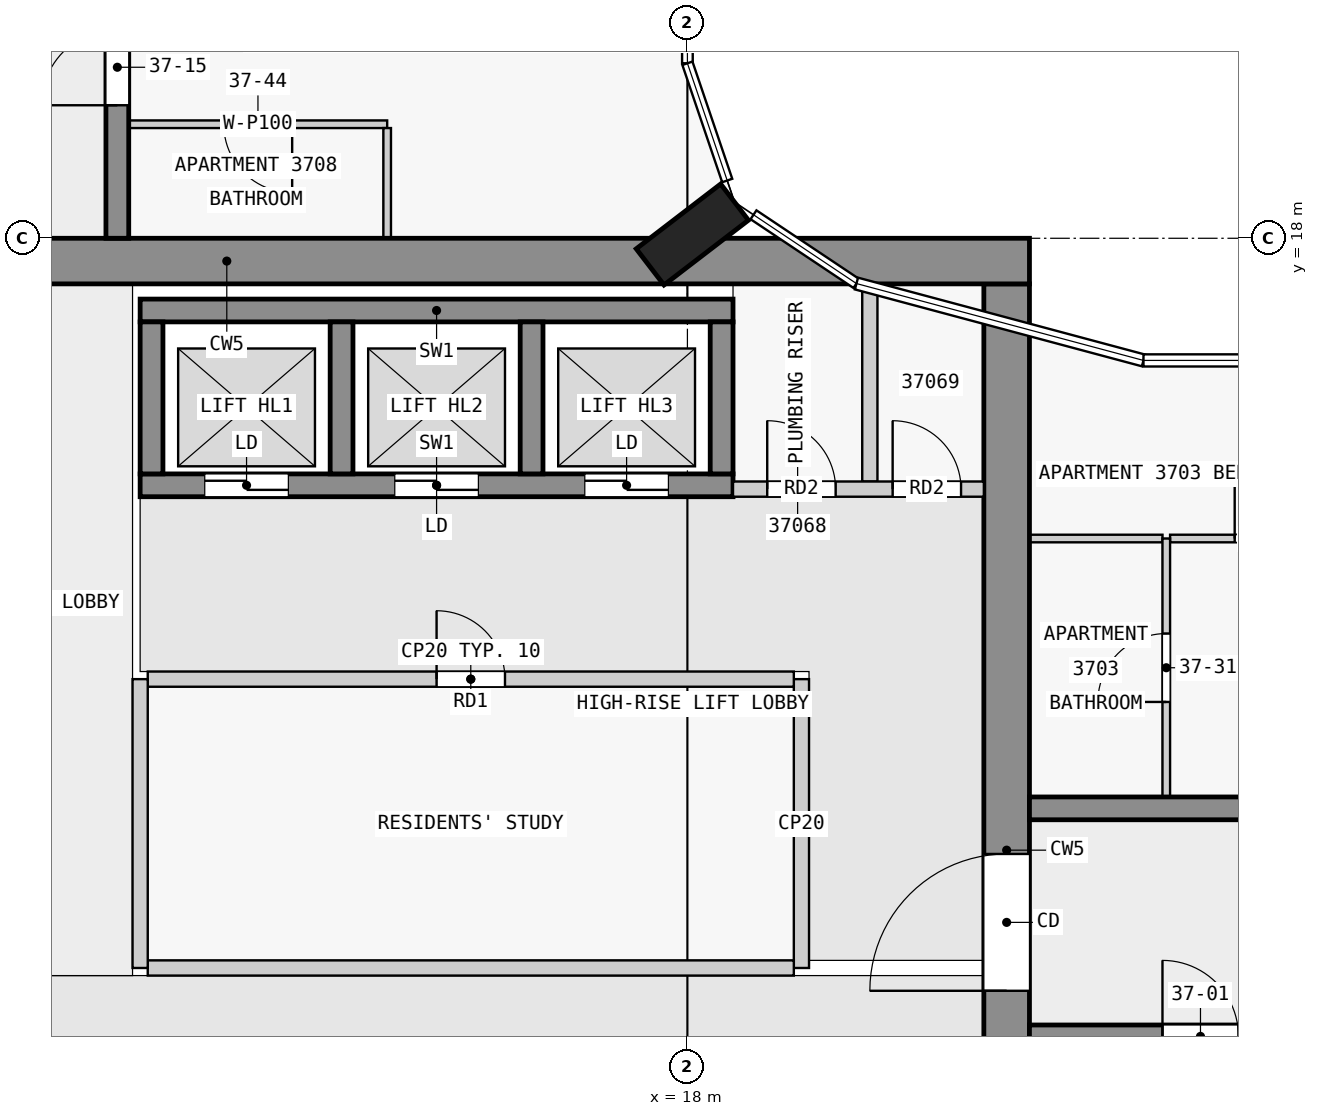
"""IFC4 building model, lengths in metres.
Left out: names, types, materials, properties, quantities, classifications, styles, units other than length and angle.
Written with IfcOpenShell. Run it as: python <this file> out.ifc"""

import sys

from ifc_helpers import new_model, si_unit, direction, frame, frame_2d, origin, origin_2d, place, context, subcontext, project, spatial, rectangle, extrude, element, fill, save


model = new_model("IFC4")
c1 = context("Model", 3, precision=1e-05, world=origin(), true_north=direction((0.0, 1.0)))
c2 = subcontext(c1, "Body", "Model", "MODEL_VIEW")
j1 = project(units=[si_unit("LENGTHUNIT", "METRE"), si_unit("PLANEANGLEUNIT", "RADIAN")], contexts=[c1])
p1 = place(None, origin())
s1 = spatial("IfcSite", under=j1, at=p1, CompositionType="ELEMENT")
p2 = place(p1, origin())
s2 = spatial("IfcBuilding", under=s1, at=p2, CompositionType="ELEMENT")
p3 = place(p2, frame((0.0, 0.0, 146.4)))
s3 = spatial("IfcBuildingStorey", under=s2, at=p3, CompositionType="ELEMENT", Elevation=146.4)
p4 = place(p3, frame((18.065, 18.05, 0.0), z_axis=(0.0, 0.0, 1.0), x_axis=(-0.608810846443, 0.793315418515, 0.0)))
e1 = element("IfcColumn", 1, at=p4, inside=s3, PredefinedType="COLUMN", context=c2, shape_type="SweptSolid", body=[
    extrude(rectangle(XDim=0.6, YDim=1.4, at=origin_2d()), origin(), (0.0, 0.0, 1.0), 3.5),
])
p5 = place(p3, frame((1.38, 17.7, 0.0), z_axis=(0.0, 0.0, 1.0), x_axis=(1.0, 0.0, 0.0)))
e2 = element("IfcWall", 2, at=p5, inside=s3, PredefinedType="SHEAR", context=c2, shape_type="SweptSolid", body=[
    extrude(rectangle(XDim=21.12, YDim=0.6, at=frame_2d((10.56, 0.0))), origin(), (0.0, 0.0, 1.0), 3.25),
])
p6 = place(p5, frame((6.4, 0.0, 0.0)))
e3 = element("IfcOpeningElement", 3, at=p6, cuts=e2, PredefinedType="OPENING", context=c2, shape_type="SweptSolid", body=[
    extrude(rectangle(XDim=1.8, YDim=2.1, at=frame_2d((0.9, 1.05))), frame((0.0, 0.31, 0.0), z_axis=(0.0, -1.0, 0.0), x_axis=(1.0, 0.0, 0.0)), (0.0, 0.0, 1.0), 0.62),
])
p7 = place(p3, frame((22.2, 2.5, 0.0), z_axis=(0.0, 0.0, 1.0), x_axis=(0.0, 1.0, 0.0)))
e4 = element("IfcWall", 4, at=p7, inside=s3, PredefinedType="SHEAR", context=c2, shape_type="SweptSolid", body=[
    extrude(rectangle(XDim=14.9, YDim=0.6, at=frame_2d((7.45, 0.0))), origin(), (0.0, 0.0, 1.0), 3.25),
])
p8 = place(p7, frame((5.6, 0.0, 0.0)))
e5 = element("IfcOpeningElement", 5, at=p8, cuts=e4, PredefinedType="OPENING", context=c2, shape_type="SweptSolid", body=[
    extrude(rectangle(XDim=1.8, YDim=2.1, at=frame_2d((0.9, 1.05))), frame((0.0, 0.31, 0.0), z_axis=(0.0, -1.0, 0.0), x_axis=(1.0, 0.0, 0.0)), (0.0, 0.0, 1.0), 0.62),
])
p9 = place(p3, frame((10.8, 17.05, 0.0), z_axis=(0.0, 0.0, 1.0), x_axis=(1.0, 0.0, 0.0)))
e6 = element("IfcWall", 6, at=p9, inside=s3, PredefinedType="SHEAR", context=c2, shape_type="SweptSolid", body=[
    extrude(rectangle(XDim=7.8, YDim=0.3, at=frame_2d((3.9, 0.0))), origin(), (0.0, 0.0, 1.0), 3.25),
])
p10 = place(p3, frame((10.8, 14.75, 0.0), z_axis=(0.0, 0.0, 1.0), x_axis=(1.0, 0.0, 0.0)))
e7 = element("IfcWall", 7, at=p10, inside=s3, PredefinedType="SHEAR", context=c2, shape_type="SweptSolid", body=[
    extrude(rectangle(XDim=7.8, YDim=0.3, at=frame_2d((3.9, 0.0))), origin(), (0.0, 0.0, 1.0), 3.25),
])
p11 = place(p10, frame((0.85, 0.0, 0.0)))
e8 = element("IfcOpeningElement", 8, at=p11, cuts=e7, PredefinedType="OPENING", context=c2, shape_type="SweptSolid", body=[
    extrude(rectangle(XDim=1.1, YDim=2.1, at=frame_2d((0.55, 1.05))), frame((0.0, 0.16, 0.0), z_axis=(0.0, -1.0, 0.0), x_axis=(1.0, 0.0, 0.0)), (0.0, 0.0, 1.0), 0.32),
])
p12 = place(p10, frame((3.35, 0.0, 0.0)))
e9 = element("IfcOpeningElement", 9, at=p12, cuts=e7, PredefinedType="OPENING", context=c2, shape_type="SweptSolid", body=[
    extrude(rectangle(XDim=1.1, YDim=2.1, at=frame_2d((0.55, 1.05))), frame((0.0, 0.16, 0.0), z_axis=(0.0, -1.0, 0.0), x_axis=(1.0, 0.0, 0.0)), (0.0, 0.0, 1.0), 0.32),
])
p13 = place(p10, frame((5.85, 0.0, 0.0)))
e10 = element("IfcOpeningElement", 10, at=p13, cuts=e7, PredefinedType="OPENING", context=c2, shape_type="SweptSolid", body=[
    extrude(rectangle(XDim=1.1, YDim=2.1, at=frame_2d((0.55, 1.05))), frame((0.0, 0.16, 0.0), z_axis=(0.0, -1.0, 0.0), x_axis=(1.0, 0.0, 0.0)), (0.0, 0.0, 1.0), 0.32),
])
for number, where, z_axis, x_axis in (
    (11, (10.95, 14.9, 0.0), (0.0, 0.0, 1.0), (0.0, 1.0, 0.0)),
    (12, (13.45, 14.9, 0.0), (0.0, 0.0, 1.0), (0.0, 1.0, 0.0)),
    (13, (15.95, 14.9, 0.0), (0.0, 0.0, 1.0), (0.0, 1.0, 0.0)),
    (14, (18.45, 14.9, 0.0), (0.0, 0.0, 1.0), (0.0, 1.0, 0.0)),
):
    element("IfcWall", number, at=place(p3, frame(where, z_axis=z_axis, x_axis=x_axis)), inside=s3, PredefinedType="SHEAR", context=c2, shape_type="SweptSolid", body=[
        extrude(rectangle(XDim=2.0, YDim=0.3, at=frame_2d((1.0, 0.0))), origin(), (0.0, 0.0, 1.0), 3.25),
    ])
p14 = place(p3, frame((22.5, 7.5, 0.0), z_axis=(0.0, 0.0, 1.0), x_axis=(1.0, 0.0, 0.0)))
e15 = element("IfcWall", 15, at=p14, inside=s3, PredefinedType="SHEAR", context=c2, shape_type="SweptSolid", body=[
    extrude(rectangle(XDim=22.5, YDim=0.3, at=frame_2d((11.25, 0.0))), origin(), (0.0, 0.0, 1.0), 3.25),
])
p15 = place(p14, frame((1.75, 0.0, 0.0)))
e16 = element("IfcOpeningElement", 16, at=p15, cuts=e15, PredefinedType="OPENING", context=c2, shape_type="SweptSolid", body=[
    extrude(rectangle(XDim=1.0, YDim=2.1, at=frame_2d((0.5, 1.05))), frame((0.0, 0.16, 0.0), z_axis=(0.0, -1.0, 0.0), x_axis=(1.0, 0.0, 0.0)), (0.0, 0.0, 1.0), 0.32),
])
p16 = place(p14, frame((6.25, 0.0, 0.0)))
e17 = element("IfcOpeningElement", 17, at=p16, cuts=e15, PredefinedType="OPENING", context=c2, shape_type="SweptSolid", body=[
    extrude(rectangle(XDim=1.0, YDim=2.1, at=frame_2d((0.5, 1.05))), frame((0.0, 0.16, 0.0), z_axis=(0.0, -1.0, 0.0), x_axis=(1.0, 0.0, 0.0)), (0.0, 0.0, 1.0), 0.32),
])
p17 = place(p14, frame((10.35, 0.0, 0.0)))
e18 = element("IfcOpeningElement", 18, at=p17, cuts=e15, PredefinedType="OPENING", context=c2, shape_type="SweptSolid", body=[
    extrude(rectangle(XDim=1.8, YDim=2.1, at=frame_2d((0.9, 1.05))), frame((0.0, 0.16, 0.0), z_axis=(0.0, -1.0, 0.0), x_axis=(1.0, 0.0, 0.0)), (0.0, 0.0, 1.0), 0.32),
])
p18 = place(p14, frame((16.85, 0.0, 0.0)))
e19 = element("IfcOpeningElement", 19, at=p18, cuts=e15, PredefinedType="OPENING", context=c2, shape_type="SweptSolid", body=[
    extrude(rectangle(XDim=1.0, YDim=2.1, at=frame_2d((0.5, 1.05))), frame((0.0, 0.16, 0.0), z_axis=(0.0, -1.0, 0.0), x_axis=(1.0, 0.0, 0.0)), (0.0, 0.0, 1.0), 0.32),
])
p19 = place(p3, frame((22.5, 10.5, 0.0), z_axis=(0.0, 0.0, 1.0), x_axis=(1.0, 0.0, 0.0)))
e20 = element("IfcWall", 20, at=p19, inside=s3, PredefinedType="SHEAR", context=c2, shape_type="SweptSolid", body=[
    extrude(rectangle(XDim=22.5, YDim=0.3, at=frame_2d((11.25, 0.0))), origin(), (0.0, 0.0, 1.0), 3.25),
])
p20 = place(p19, frame((4.05, 0.0, 0.0)))
e21 = element("IfcOpeningElement", 21, at=p20, cuts=e20, PredefinedType="OPENING", context=c2, shape_type="SweptSolid", body=[
    extrude(rectangle(XDim=1.0, YDim=2.1, at=frame_2d((0.5, 1.05))), frame((0.0, 0.16, 0.0), z_axis=(0.0, -1.0, 0.0), x_axis=(1.0, 0.0, 0.0)), (0.0, 0.0, 1.0), 0.32),
])
p21 = place(p19, frame((10.85, 0.0, 0.0)))
e22 = element("IfcOpeningElement", 22, at=p21, cuts=e20, PredefinedType="OPENING", context=c2, shape_type="SweptSolid", body=[
    extrude(rectangle(XDim=0.9, YDim=2.1, at=frame_2d((0.45, 1.05))), frame((0.0, 0.16, 0.0), z_axis=(0.0, -1.0, 0.0), x_axis=(1.0, 0.0, 0.0)), (0.0, 0.0, 1.0), 0.32),
])
p22 = place(p19, frame((15.25, 0.0, 0.0)))
e23 = element("IfcOpeningElement", 23, at=p22, cuts=e20, PredefinedType="OPENING", context=c2, shape_type="SweptSolid", body=[
    extrude(rectangle(XDim=1.0, YDim=2.1, at=frame_2d((0.5, 1.05))), frame((0.0, 0.16, 0.0), z_axis=(0.0, -1.0, 0.0), x_axis=(1.0, 0.0, 0.0)), (0.0, 0.0, 1.0), 0.32),
])
p23 = place(p19, frame((18.75, 0.0, 0.0)))
e24 = element("IfcOpeningElement", 24, at=p23, cuts=e20, PredefinedType="OPENING", context=c2, shape_type="SweptSolid", body=[
    extrude(rectangle(XDim=0.9, YDim=2.1, at=frame_2d((0.45, 1.05))), frame((0.0, 0.16, 0.0), z_axis=(0.0, -1.0, 0.0), x_axis=(1.0, 0.0, 0.0)), (0.0, 0.0, 1.0), 0.32),
])
p24 = place(p19, frame((20.95, 0.0, 0.0)))
e25 = element("IfcOpeningElement", 25, at=p24, cuts=e20, PredefinedType="OPENING", context=c2, shape_type="SweptSolid", body=[
    extrude(rectangle(XDim=1.0, YDim=2.1, at=frame_2d((0.5, 1.05))), frame((0.0, 0.16, 0.0), z_axis=(0.0, -1.0, 0.0), x_axis=(1.0, 0.0, 0.0)), (0.0, 0.0, 1.0), 0.32),
])
p25 = place(p3, frame((10.5, 18.0, 0.0), z_axis=(0.0, 0.0, 1.0), x_axis=(0.0, 1.0, 0.0)))
e26 = element("IfcWall", 26, at=p25, inside=s3, PredefinedType="SHEAR", context=c2, shape_type="SweptSolid", body=[
    extrude(rectangle(XDim=27.0, YDim=0.3, at=frame_2d((13.5, 0.0))), origin(), (0.0, 0.0, 1.0), 3.25),
])
p26 = place(p25, frame((1.75, 0.0, 0.0)))
e27 = element("IfcOpeningElement", 27, at=p26, cuts=e26, PredefinedType="OPENING", context=c2, shape_type="SweptSolid", body=[
    extrude(rectangle(XDim=1.0, YDim=2.1, at=frame_2d((0.5, 1.05))), frame((0.0, 0.16, 0.0), z_axis=(0.0, -1.0, 0.0), x_axis=(1.0, 0.0, 0.0)), (0.0, 0.0, 1.0), 0.32),
])
p27 = place(p25, frame((6.25, 0.0, 0.0)))
e28 = element("IfcOpeningElement", 28, at=p27, cuts=e26, PredefinedType="OPENING", context=c2, shape_type="SweptSolid", body=[
    extrude(rectangle(XDim=1.0, YDim=2.1, at=frame_2d((0.5, 1.05))), frame((0.0, 0.16, 0.0), z_axis=(0.0, -1.0, 0.0), x_axis=(1.0, 0.0, 0.0)), (0.0, 0.0, 1.0), 0.32),
])
p28 = place(p25, frame((10.35, 0.0, 0.0)))
e29 = element("IfcOpeningElement", 29, at=p28, cuts=e26, PredefinedType="OPENING", context=c2, shape_type="SweptSolid", body=[
    extrude(rectangle(XDim=1.8, YDim=2.1, at=frame_2d((0.9, 1.05))), frame((0.0, 0.16, 0.0), z_axis=(0.0, -1.0, 0.0), x_axis=(1.0, 0.0, 0.0)), (0.0, 0.0, 1.0), 0.32),
])
p29 = place(p25, frame((15.25, 0.0, 0.0)))
e30 = element("IfcOpeningElement", 30, at=p29, cuts=e26, PredefinedType="OPENING", context=c2, shape_type="SweptSolid", body=[
    extrude(rectangle(XDim=1.0, YDim=2.1, at=frame_2d((0.5, 1.05))), frame((0.0, 0.16, 0.0), z_axis=(0.0, -1.0, 0.0), x_axis=(1.0, 0.0, 0.0)), (0.0, 0.0, 1.0), 0.32),
])
p30 = place(p25, frame((21.35, 0.0, 0.0)))
e31 = element("IfcOpeningElement", 31, at=p30, cuts=e26, PredefinedType="OPENING", context=c2, shape_type="SweptSolid", body=[
    extrude(rectangle(XDim=1.0, YDim=2.1, at=frame_2d((0.5, 1.05))), frame((0.0, 0.16, 0.0), z_axis=(0.0, -1.0, 0.0), x_axis=(1.0, 0.0, 0.0)), (0.0, 0.0, 1.0), 0.32),
])
p31 = place(p3, frame((10.8, 8.4, 0.0), z_axis=(0.0, 0.0, 1.0), x_axis=(0.0, 1.0, 0.0)))
e32 = element("IfcWall", 32, at=p31, inside=s3, PredefinedType="PARTITIONING", context=c2, shape_type="SweptSolid", body=[
    extrude(rectangle(XDim=3.8, YDim=0.2, at=frame_2d((1.9, 0.0))), origin(), (0.0, 0.0, 1.0), 3.25),
])
p32 = place(p3, frame((10.9, 8.4, 0.0), z_axis=(0.0, 0.0, 1.0), x_axis=(1.0, 0.0, 0.0)))
e33 = element("IfcWall", 33, at=p32, inside=s3, PredefinedType="PARTITIONING", context=c2, shape_type="SweptSolid", body=[
    extrude(rectangle(XDim=8.5, YDim=0.2, at=frame_2d((4.25, 0.0))), origin(), (0.0, 0.0, 1.0), 3.25),
])
p33 = place(p3, frame((19.5, 8.4, 0.0), z_axis=(0.0, 0.0, 1.0), x_axis=(0.0, 1.0, 0.0)))
e34 = element("IfcWall", 34, at=p33, inside=s3, PredefinedType="PARTITIONING", context=c2, shape_type="SweptSolid", body=[
    extrude(rectangle(XDim=3.8, YDim=0.2, at=frame_2d((1.9, 0.0))), origin(), (0.0, 0.0, 1.0), 3.25),
])
p34 = place(p3, frame((10.9, 12.2, 0.0), z_axis=(0.0, 0.0, 1.0), x_axis=(1.0, 0.0, 0.0)))
e35 = element("IfcWall", 35, at=p34, inside=s3, PredefinedType="PARTITIONING", context=c2, shape_type="SweptSolid", body=[
    extrude(rectangle(XDim=8.5, YDim=0.2, at=frame_2d((4.25, 0.0))), origin(), (0.0, 0.0, 1.0), 3.25),
])
p35 = place(p34, frame((3.8, 0.0, 0.0)))
e36 = element("IfcOpeningElement", 36, at=p35, cuts=e35, PredefinedType="OPENING", context=c2, shape_type="SweptSolid", body=[
    extrude(rectangle(XDim=0.9, YDim=2.1, at=frame_2d((0.45, 1.05))), frame((0.0, 0.11, 0.0), z_axis=(0.0, -1.0, 0.0), x_axis=(1.0, 0.0, 0.0)), (0.0, 0.0, 1.0), 0.22),
])
p36 = place(p3, frame((18.6, 14.7, 0.0), z_axis=(0.0, 0.0, 1.0), x_axis=(1.0, 0.0, 0.0)))
e37 = element("IfcWall", 37, at=p36, inside=s3, PredefinedType="PARTITIONING", context=c2, shape_type="SweptSolid", body=[
    extrude(rectangle(XDim=3.3, YDim=0.2, at=frame_2d((1.65, 0.0))), origin(), (0.0, 0.0, 1.0), 3.25),
])
p37 = place(p36, frame((0.45, 0.0, 0.0)))
e38 = element("IfcOpeningElement", 38, at=p37, cuts=e37, PredefinedType="OPENING", context=c2, shape_type="SweptSolid", body=[
    extrude(rectangle(XDim=0.9, YDim=2.1, at=frame_2d((0.45, 1.05))), frame((0.0, 0.11, 0.0), z_axis=(0.0, -1.0, 0.0), x_axis=(1.0, 0.0, 0.0)), (0.0, 0.0, 1.0), 0.22),
])
p38 = place(p36, frame((2.1, 0.0, 0.0)))
e39 = element("IfcOpeningElement", 39, at=p38, cuts=e37, PredefinedType="OPENING", context=c2, shape_type="SweptSolid", body=[
    extrude(rectangle(XDim=0.9, YDim=2.1, at=frame_2d((0.45, 1.05))), frame((0.0, 0.11, 0.0), z_axis=(0.0, -1.0, 0.0), x_axis=(1.0, 0.0, 0.0)), (0.0, 0.0, 1.0), 0.22),
])
p39 = place(p3, frame((20.4, 14.8, 0.0), z_axis=(0.0, 0.0, 1.0), x_axis=(0.0, 1.0, 0.0)))
e40 = element("IfcWall", 40, at=p39, inside=s3, PredefinedType="PARTITIONING", context=c2, shape_type="SweptSolid", body=[
    extrude(rectangle(XDim=2.6, YDim=0.2, at=frame_2d((1.3, 0.0))), origin(), (0.0, 0.0, 1.0), 3.25),
])
p40 = place(p3, frame((24.25, 14.05, 0.0), z_axis=(0.0, 0.0, 1.0), x_axis=(-1.0, 0.0, 0.0)))
e41 = element("IfcWall", 41, at=p40, inside=s3, PredefinedType="PARTITIONING", context=c2, shape_type="SweptSolid", body=[
    extrude(rectangle(XDim=1.75, YDim=0.1, at=frame_2d((0.875, 0.0))), origin(), (0.0, 0.0, 1.0), 3.25),
])
p41 = place(p3, frame((24.35, 14.05, 0.0), z_axis=(0.0, 0.0, 1.0), x_axis=(1.0, 0.0, 0.0)))
e42 = element("IfcWall", 42, at=p41, inside=s3, PredefinedType="PARTITIONING", context=c2, shape_type="SweptSolid", body=[
    extrude(rectangle(XDim=2.65, YDim=0.1, at=frame_2d((1.325, 0.0))), origin(), (0.0, 0.0, 1.0), 3.25),
])
p42 = place(p41, frame((0.85, 0.0, 0.0)))
e43 = element("IfcOpeningElement", 43, at=p42, cuts=e42, PredefinedType="OPENING", context=c2, shape_type="SweptSolid", body=[
    extrude(rectangle(XDim=0.9, YDim=2.1, at=frame_2d((0.45, 1.05))), frame((0.0, 0.06, 0.0), z_axis=(0.0, -1.0, 0.0), x_axis=(1.0, 0.0, 0.0)), (0.0, 0.0, 1.0), 0.12),
])
p43 = place(p3, frame((14.05, 19.5, 0.0), z_axis=(0.0, 0.0, 1.0), x_axis=(-1.0, 0.0, 0.0)))
e44 = element("IfcWall", 44, at=p43, inside=s3, PredefinedType="PARTITIONING", context=c2, shape_type="SweptSolid", body=[
    extrude(rectangle(XDim=3.4, YDim=0.1, at=frame_2d((1.7, 0.0))), origin(), (0.0, 0.0, 1.0), 3.25),
])
p44 = place(p43, frame((1.25, 0.0, 0.0)))
e45 = element("IfcOpeningElement", 45, at=p44, cuts=e44, PredefinedType="OPENING", context=c2, shape_type="SweptSolid", body=[
    extrude(rectangle(XDim=0.9, YDim=2.1, at=frame_2d((0.45, 1.05))), frame((0.0, 0.06, 0.0), z_axis=(0.0, -1.0, 0.0), x_axis=(1.0, 0.0, 0.0)), (0.0, 0.0, 1.0), 0.12),
])
p45 = place(p3, frame((14.05, 18.0, 0.0), z_axis=(0.0, 0.0, 1.0), x_axis=(0.0, 1.0, 0.0)))
e46 = element("IfcWall", 46, at=p45, inside=s3, PredefinedType="PARTITIONING", context=c2, shape_type="SweptSolid", body=[
    extrude(rectangle(XDim=1.45, YDim=0.1, at=frame_2d((0.725, 0.0))), origin(), (0.0, 0.0, 1.0), 3.25),
])
p46 = place(p3, frame((24.3, 10.65, 0.0), z_axis=(0.0, 0.0, 1.0), x_axis=(0.0, 1.0, 0.0)))
e47 = element("IfcWall", 47, at=p46, inside=s3, PredefinedType="PARTITIONING", context=c2, shape_type="SweptSolid", body=[
    extrude(rectangle(XDim=3.4, YDim=0.1, at=frame_2d((1.7, 0.0))), origin(), (0.0, 0.0, 1.0), 3.25),
])
p47 = place(p46, frame((1.25, 0.0, 0.0)))
e48 = element("IfcOpeningElement", 48, at=p47, cuts=e47, PredefinedType="OPENING", context=c2, shape_type="SweptSolid", body=[
    extrude(rectangle(XDim=0.9, YDim=2.1, at=frame_2d((0.45, 1.05))), frame((0.0, 0.06, 0.0), z_axis=(0.0, -1.0, 0.0), x_axis=(1.0, 0.0, 0.0)), (0.0, 0.0, 1.0), 0.12),
])
p48 = place(p35, origin())
e49 = element("IfcDoor", 49, at=p48, inside=s3, OperationType="SINGLE_SWING_LEFT", PredefinedType="DOOR", context=c2, shape_type="SweptSolid", body=[
    extrude(rectangle(XDim=0.9, YDim=2.1, at=frame_2d((0.45, 1.05))), frame((0.0, 0.025, 0.0), z_axis=(0.0, -1.0, 0.0), x_axis=(1.0, 0.0, 0.0)), (0.0, 0.0, 1.0), 0.05),
])
fill(e36, e49)
p49 = place(p11, origin())
e50 = element("IfcDoor", 50, at=p49, inside=s3, OperationType="DOUBLE_DOOR_SLIDING", PredefinedType="DOOR", context=c2, shape_type="SweptSolid", body=[
    extrude(rectangle(XDim=1.1, YDim=2.1, at=frame_2d((0.55, 1.05))), frame((0.0, 0.025, 0.0), z_axis=(0.0, -1.0, 0.0), x_axis=(1.0, 0.0, 0.0)), (0.0, 0.0, 1.0), 0.05),
])
fill(e8, e50)
p50 = place(p12, origin())
e51 = element("IfcDoor", 51, at=p50, inside=s3, OperationType="DOUBLE_DOOR_SLIDING", PredefinedType="DOOR", context=c2, shape_type="SweptSolid", body=[
    extrude(rectangle(XDim=1.1, YDim=2.1, at=frame_2d((0.55, 1.05))), frame((0.0, 0.025, 0.0), z_axis=(0.0, -1.0, 0.0), x_axis=(1.0, 0.0, 0.0)), (0.0, 0.0, 1.0), 0.05),
])
fill(e9, e51)
p51 = place(p13, origin())
e52 = element("IfcDoor", 52, at=p51, inside=s3, OperationType="DOUBLE_DOOR_SLIDING", PredefinedType="DOOR", context=c2, shape_type="SweptSolid", body=[
    extrude(rectangle(XDim=1.1, YDim=2.1, at=frame_2d((0.55, 1.05))), frame((0.0, 0.025, 0.0), z_axis=(0.0, -1.0, 0.0), x_axis=(1.0, 0.0, 0.0)), (0.0, 0.0, 1.0), 0.05),
])
fill(e10, e52)
p52 = place(p8, origin())
e53 = element("IfcDoor", 53, at=p52, inside=s3, OperationType="DOUBLE_DOOR_SINGLE_SWING", PredefinedType="DOOR", context=c2, shape_type="SweptSolid", body=[
    extrude(rectangle(XDim=1.8, YDim=2.1, at=frame_2d((0.9, 1.05))), frame((0.0, 0.025, 0.0), z_axis=(0.0, -1.0, 0.0), x_axis=(1.0, 0.0, 0.0)), (0.0, 0.0, 1.0), 0.05),
])
fill(e5, e53)
p53 = place(p37, origin())
e54 = element("IfcDoor", 54, at=p53, inside=s3, OperationType="SINGLE_SWING_LEFT", PredefinedType="DOOR", context=c2, shape_type="SweptSolid", body=[
    extrude(rectangle(XDim=0.9, YDim=2.1, at=frame_2d((0.45, 1.05))), frame((0.0, 0.025, 0.0), z_axis=(0.0, -1.0, 0.0), x_axis=(1.0, 0.0, 0.0)), (0.0, 0.0, 1.0), 0.05),
])
fill(e38, e54)
p54 = place(p38, origin())
e55 = element("IfcDoor", 55, at=p54, inside=s3, OperationType="SINGLE_SWING_LEFT", PredefinedType="DOOR", context=c2, shape_type="SweptSolid", body=[
    extrude(rectangle(XDim=0.9, YDim=2.1, at=frame_2d((0.45, 1.05))), frame((0.0, 0.025, 0.0), z_axis=(0.0, -1.0, 0.0), x_axis=(1.0, 0.0, 0.0)), (0.0, 0.0, 1.0), 0.05),
])
fill(e39, e55)
p55 = place(p15, origin())
e56 = element("IfcDoor", 56, at=p55, inside=s3, OperationType="SINGLE_SWING_LEFT", PredefinedType="DOOR", context=c2, shape_type="SweptSolid", body=[
    extrude(rectangle(XDim=1.0, YDim=2.1, at=frame_2d((0.5, 1.05))), frame((0.0, 0.025, 0.0), z_axis=(0.0, -1.0, 0.0), x_axis=(1.0, 0.0, 0.0)), (0.0, 0.0, 1.0), 0.05),
])
fill(e16, e56)
p56 = place(p26, origin())
e57 = element("IfcDoor", 57, at=p56, inside=s3, OperationType="SINGLE_SWING_LEFT", PredefinedType="DOOR", context=c2, shape_type="SweptSolid", body=[
    extrude(rectangle(XDim=1.0, YDim=2.1, at=frame_2d((0.5, 1.05))), frame((0.0, 0.025, 0.0), z_axis=(0.0, -1.0, 0.0), x_axis=(1.0, 0.0, 0.0)), (0.0, 0.0, 1.0), 0.05),
])
fill(e27, e57)
p57 = place(p47, origin())
e58 = element("IfcDoor", 58, at=p57, inside=s3, OperationType="SINGLE_SWING_LEFT", PredefinedType="DOOR", context=c2, shape_type="SweptSolid", body=[
    extrude(rectangle(XDim=0.9, YDim=2.1, at=frame_2d((0.45, 1.05))), frame((0.0, 0.025, 0.0), z_axis=(0.0, -1.0, 0.0), x_axis=(1.0, 0.0, 0.0)), (0.0, 0.0, 1.0), 0.05),
])
fill(e48, e58)
p58 = place(p42, origin())
e59 = element("IfcDoor", 59, at=p58, inside=s3, OperationType="SINGLE_SWING_LEFT", PredefinedType="DOOR", context=c2, shape_type="SweptSolid", body=[
    extrude(rectangle(XDim=0.9, YDim=2.1, at=frame_2d((0.45, 1.05))), frame((0.0, 0.025, 0.0), z_axis=(0.0, -1.0, 0.0), x_axis=(1.0, 0.0, 0.0)), (0.0, 0.0, 1.0), 0.05),
])
fill(e43, e59)
p59 = place(p44, origin())
e60 = element("IfcDoor", 60, at=p59, inside=s3, OperationType="SINGLE_SWING_LEFT", PredefinedType="DOOR", context=c2, shape_type="SweptSolid", body=[
    extrude(rectangle(XDim=0.9, YDim=2.1, at=frame_2d((0.45, 1.05))), frame((0.0, 0.025, 0.0), z_axis=(0.0, -1.0, 0.0), x_axis=(1.0, 0.0, 0.0)), (0.0, 0.0, 1.0), 0.05),
])
fill(e45, e60)
save(model, sys.argv[1])
